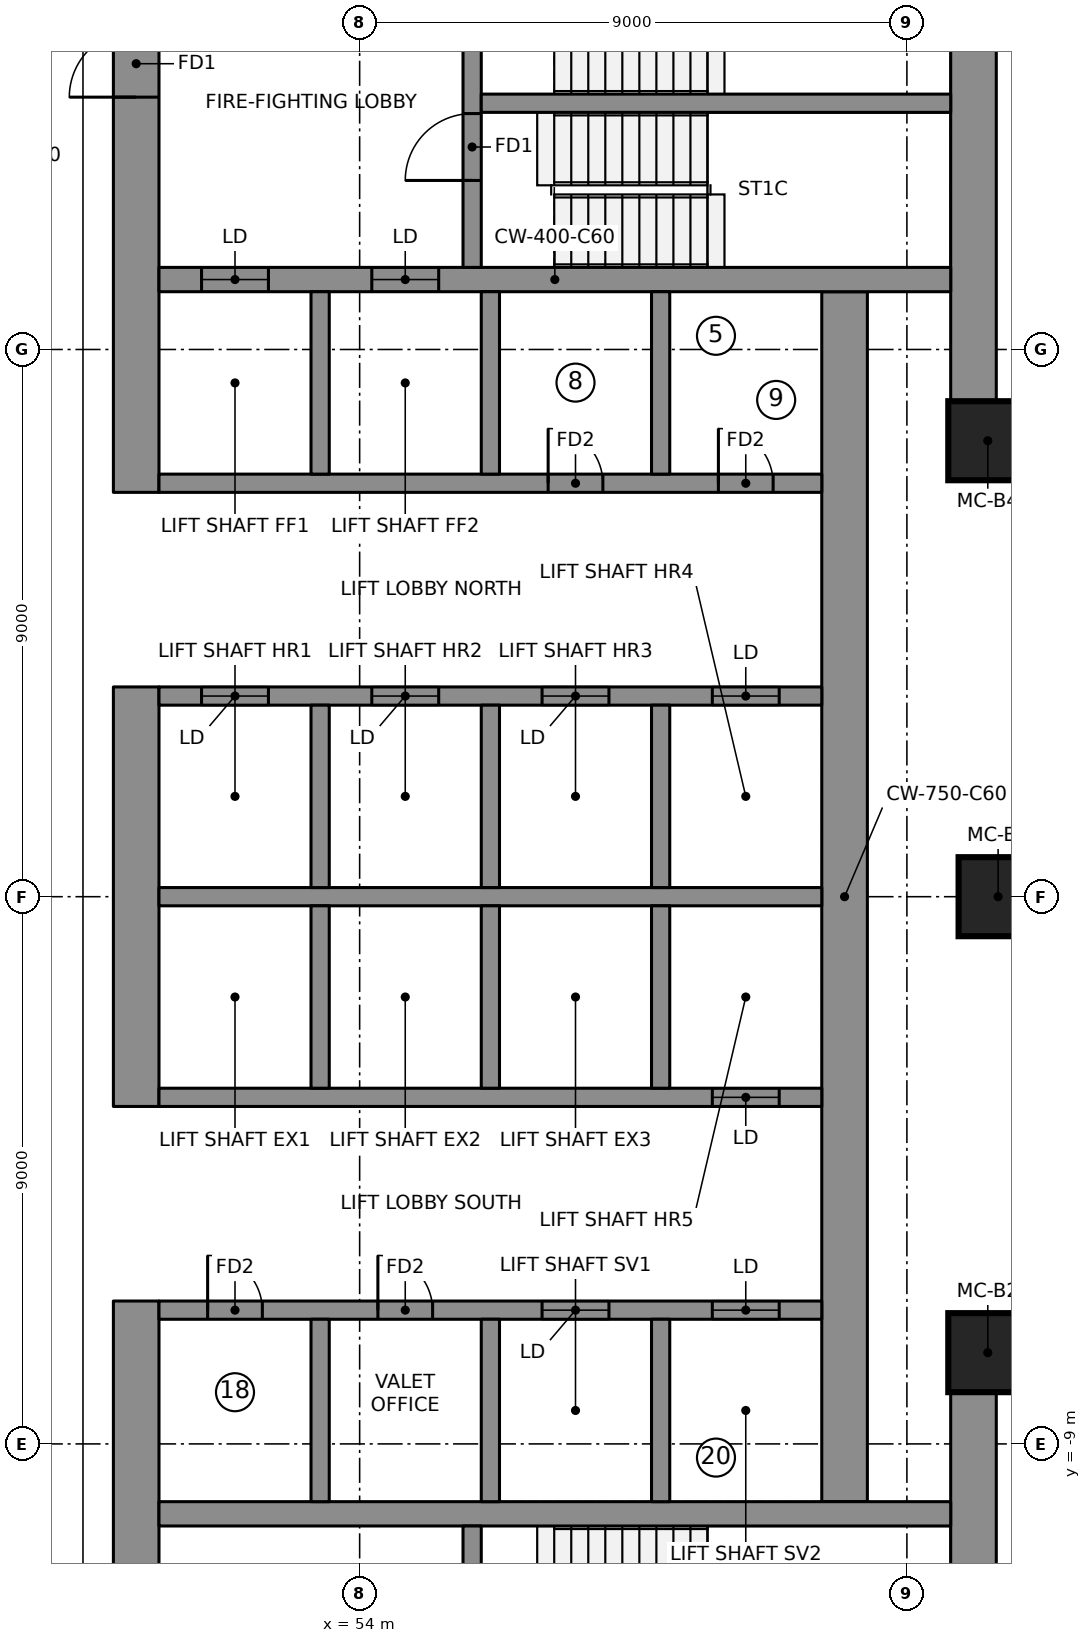
"""IFC4 building model, lengths in metres.
Left out: names, types, materials, properties, quantities, classifications, styles, units other than length and angle.
Written with IfcOpenShell. Run it as: python <this file> out.ifc"""

import sys

from ifc_helpers import new_model, si_unit, direction, frame, frame_2d, origin, origin_2d, place, context, subcontext, project, spatial, rectangle, extrude, element, fill, save


model = new_model("IFC4")
c1 = context("Model", 3, precision=1e-05, world=origin(), true_north=direction((0.0, 1.0)))
c2 = subcontext(c1, "Body", "Model", "MODEL_VIEW")
j1 = project(units=[si_unit("LENGTHUNIT", "METRE"), si_unit("PLANEANGLEUNIT", "RADIAN")], contexts=[c1])
p1 = place(None, origin())
s1 = spatial("IfcSite", under=j1, at=p1, CompositionType="ELEMENT")
p2 = place(p1, origin())
s2 = spatial("IfcBuilding", under=s1, at=p2, CompositionType="ELEMENT")
p3 = place(p2, frame((0.0, 0.0, 196.8)))
s3 = spatial("IfcBuildingStorey", under=s2, at=p3, CompositionType="ELEMENT", Elevation=196.8)
p4 = place(p3, frame((50.325, 6.65, 0.0), z_axis=(0.0, 0.0, 1.0), x_axis=(0.0, 1.0, 0.0)))
e1 = element("IfcWall", 1, at=p4, inside=s3, PredefinedType="SHEAR", context=c2, shape_type="SweptSolid", body=[
    extrude(rectangle(XDim=9.85, YDim=0.75, at=frame_2d((4.925, 0.0))), origin(), (0.0, 0.0, 1.0), 3.55),
])
p5 = place(p4, frame((6.5, 0.0, 0.0)))
e2 = element("IfcOpeningElement", 2, at=p5, cuts=e1, PredefinedType="OPENING", context=c2, shape_type="SweptSolid", body=[
    extrude(rectangle(XDim=1.1, YDim=2.1, at=frame_2d((0.55, 1.05))), frame((0.0, 0.385, 0.0), z_axis=(0.0, -1.0, 0.0), x_axis=(1.0, 0.0, 0.0)), (0.0, 0.0, 1.0), 0.77),
])
p6 = place(p3, frame((50.325, -3.45, 0.0), z_axis=(0.0, 0.0, 1.0), x_axis=(0.0, 1.0, 0.0)))
e3 = element("IfcWall", 3, at=p6, inside=s3, PredefinedType="SHEAR", context=c2, shape_type="SweptSolid", body=[
    extrude(rectangle(XDim=6.9, YDim=0.75, at=frame_2d((3.45, 0.0))), origin(), (0.0, 0.0, 1.0), 3.55),
])
p7 = place(p3, frame((50.325, -16.5, 0.0), z_axis=(0.0, 0.0, 1.0), x_axis=(0.0, 1.0, 0.0)))
e4 = element("IfcWall", 4, at=p7, inside=s3, PredefinedType="SHEAR", context=c2, shape_type="SweptSolid", body=[
    extrude(rectangle(XDim=9.85, YDim=0.75, at=frame_2d((4.925, 0.0))), origin(), (0.0, 0.0, 1.0), 3.55),
])
p8 = place(p7, frame((2.25, 0.0, 0.0)))
e5 = element("IfcOpeningElement", 5, at=p8, cuts=e4, PredefinedType="OPENING", context=c2, shape_type="SweptSolid", body=[
    extrude(rectangle(XDim=1.1, YDim=2.1, at=frame_2d((0.55, 1.05))), frame((0.0, 0.385, 0.0), z_axis=(0.0, -1.0, 0.0), x_axis=(1.0, 0.0, 0.0)), (0.0, 0.0, 1.0), 0.77),
])
for number, where, z_axis, x_axis in (
    (6, (64.095, 8.099, 0.0), (0.0, 0.0, 1.0), (0.0, 1.0, 0.0)),
    (7, (64.095, -15.75, 0.0), (0.0, 0.0, 1.0), (0.0, 1.0, 0.0)),
):
    element("IfcWall", number, at=place(p3, frame(where, z_axis=z_axis, x_axis=x_axis)), inside=s3, PredefinedType="SHEAR", context=c2, shape_type="SweptSolid", body=[
        extrude(rectangle(XDim=7.651, YDim=0.75, at=frame_2d((3.825, 0.0))), origin(), (0.0, 0.0, 1.0), 3.55),
    ])
p9 = place(p3, frame((61.975, -9.95, 0.0), z_axis=(0.0, 0.0, 1.0), x_axis=(0.0, 1.0, 0.0)))
e8 = element("IfcWall", 8, at=p9, inside=s3, PredefinedType="SHEAR", context=c2, shape_type="SweptSolid", body=[
    extrude(rectangle(XDim=19.9, YDim=0.75, at=frame_2d((9.95, 0.0))), origin(), (0.0, 0.0, 1.0), 3.55),
])
p10 = place(p3, frame((50.7, 10.15, 0.0), z_axis=(0.0, 0.0, 1.0), x_axis=(1.0, 0.0, 0.0)))
e9 = element("IfcWall", 9, at=p10, inside=s3, PredefinedType="SHEAR", context=c2, shape_type="SweptSolid", body=[
    extrude(rectangle(XDim=13.02, YDim=0.4, at=frame_2d((6.51, 0.0))), origin(), (0.0, 0.0, 1.0), 3.55),
])
p11 = place(p10, frame((0.7, 0.0, 0.0)))
e10 = element("IfcOpeningElement", 10, at=p11, cuts=e9, PredefinedType="OPENING", context=c2, shape_type="SweptSolid", body=[
    extrude(rectangle(XDim=1.1, YDim=2.1, at=frame_2d((0.55, 1.05))), frame((0.0, 0.21, 0.0), z_axis=(0.0, -1.0, 0.0), x_axis=(1.0, 0.0, 0.0)), (0.0, 0.0, 1.0), 0.42),
])
p12 = place(p10, frame((3.5, 0.0, 0.0)))
e11 = element("IfcOpeningElement", 11, at=p12, cuts=e9, PredefinedType="OPENING", context=c2, shape_type="SweptSolid", body=[
    extrude(rectangle(XDim=1.1, YDim=2.1, at=frame_2d((0.55, 1.05))), frame((0.0, 0.21, 0.0), z_axis=(0.0, -1.0, 0.0), x_axis=(1.0, 0.0, 0.0)), (0.0, 0.0, 1.0), 0.42),
])
p13 = place(p3, frame((50.7, -10.15, 0.0), z_axis=(0.0, 0.0, 1.0), x_axis=(1.0, 0.0, 0.0)))
e12 = element("IfcWall", 12, at=p13, inside=s3, PredefinedType="SHEAR", context=c2, shape_type="SweptSolid", body=[
    extrude(rectangle(XDim=13.02, YDim=0.4, at=frame_2d((6.51, 0.0))), origin(), (0.0, 0.0, 1.0), 3.55),
])
p14 = place(p3, frame((50.7, 0.0, 0.0), z_axis=(0.0, 0.0, 1.0), x_axis=(1.0, 0.0, 0.0)))
e13 = element("IfcWall", 13, at=p14, inside=s3, PredefinedType="SHEAR", context=c2, shape_type="SweptSolid", body=[
    extrude(rectangle(XDim=10.9, YDim=0.3, at=frame_2d((5.45, 0.0))), origin(), (0.0, 0.0, 1.0), 3.55),
])
p15 = place(p3, frame((50.7, 3.3, 0.0), z_axis=(0.0, 0.0, 1.0), x_axis=(1.0, 0.0, 0.0)))
e14 = element("IfcWall", 14, at=p15, inside=s3, PredefinedType="SHEAR", context=c2, shape_type="SweptSolid", body=[
    extrude(rectangle(XDim=10.9, YDim=0.3, at=frame_2d((5.45, 0.0))), origin(), (0.0, 0.0, 1.0), 3.55),
])
p16 = place(p15, frame((0.7, 0.0, 0.0)))
e15 = element("IfcOpeningElement", 15, at=p16, cuts=e14, PredefinedType="OPENING", context=c2, shape_type="SweptSolid", body=[
    extrude(rectangle(XDim=1.1, YDim=2.1, at=frame_2d((0.55, 1.05))), frame((0.0, 0.16, 0.0), z_axis=(0.0, -1.0, 0.0), x_axis=(1.0, 0.0, 0.0)), (0.0, 0.0, 1.0), 0.32),
])
p17 = place(p15, frame((3.5, 0.0, 0.0)))
e16 = element("IfcOpeningElement", 16, at=p17, cuts=e14, PredefinedType="OPENING", context=c2, shape_type="SweptSolid", body=[
    extrude(rectangle(XDim=1.1, YDim=2.1, at=frame_2d((0.55, 1.05))), frame((0.0, 0.16, 0.0), z_axis=(0.0, -1.0, 0.0), x_axis=(1.0, 0.0, 0.0)), (0.0, 0.0, 1.0), 0.32),
])
p18 = place(p15, frame((6.3, 0.0, 0.0)))
e17 = element("IfcOpeningElement", 17, at=p18, cuts=e14, PredefinedType="OPENING", context=c2, shape_type="SweptSolid", body=[
    extrude(rectangle(XDim=1.1, YDim=2.1, at=frame_2d((0.55, 1.05))), frame((0.0, 0.16, 0.0), z_axis=(0.0, -1.0, 0.0), x_axis=(1.0, 0.0, 0.0)), (0.0, 0.0, 1.0), 0.32),
])
p19 = place(p15, frame((9.1, 0.0, 0.0)))
e18 = element("IfcOpeningElement", 18, at=p19, cuts=e14, PredefinedType="OPENING", context=c2, shape_type="SweptSolid", body=[
    extrude(rectangle(XDim=1.1, YDim=2.1, at=frame_2d((0.55, 1.05))), frame((0.0, 0.16, 0.0), z_axis=(0.0, -1.0, 0.0), x_axis=(1.0, 0.0, 0.0)), (0.0, 0.0, 1.0), 0.32),
])
p20 = place(p3, frame((50.7, 6.8, 0.0), z_axis=(0.0, 0.0, 1.0), x_axis=(1.0, 0.0, 0.0)))
e19 = element("IfcWall", 19, at=p20, inside=s3, PredefinedType="SHEAR", context=c2, shape_type="SweptSolid", body=[
    extrude(rectangle(XDim=10.9, YDim=0.3, at=frame_2d((5.45, 0.0))), origin(), (0.0, 0.0, 1.0), 3.55),
])
p21 = place(p20, frame((6.4, 0.0, 0.0)))
e20 = element("IfcOpeningElement", 20, at=p21, cuts=e19, PredefinedType="OPENING", context=c2, shape_type="SweptSolid", body=[
    extrude(rectangle(XDim=0.9, YDim=2.1, at=frame_2d((0.45, 1.05))), frame((0.0, 0.16, 0.0), z_axis=(0.0, -1.0, 0.0), x_axis=(1.0, 0.0, 0.0)), (0.0, 0.0, 1.0), 0.32),
])
p22 = place(p20, frame((9.2, 0.0, 0.0)))
e21 = element("IfcOpeningElement", 21, at=p22, cuts=e19, PredefinedType="OPENING", context=c2, shape_type="SweptSolid", body=[
    extrude(rectangle(XDim=0.9, YDim=2.1, at=frame_2d((0.45, 1.05))), frame((0.0, 0.16, 0.0), z_axis=(0.0, -1.0, 0.0), x_axis=(1.0, 0.0, 0.0)), (0.0, 0.0, 1.0), 0.32),
])
for number, where, z_axis, x_axis in (
    (22, (53.35, 0.15, 0.0), (0.0, 0.0, 1.0), (0.0, 1.0, 0.0)),
    (23, (53.35, 6.95, 0.0), (0.0, 0.0, 1.0), (0.0, 1.0, 0.0)),
    (24, (56.15, 0.15, 0.0), (0.0, 0.0, 1.0), (0.0, 1.0, 0.0)),
    (25, (56.15, 6.95, 0.0), (0.0, 0.0, 1.0), (0.0, 1.0, 0.0)),
    (26, (58.95, 0.15, 0.0), (0.0, 0.0, 1.0), (0.0, 1.0, 0.0)),
    (27, (58.95, 6.95, 0.0), (0.0, 0.0, 1.0), (0.0, 1.0, 0.0)),
):
    element("IfcWall", number, at=place(p3, frame(where, z_axis=z_axis, x_axis=x_axis)), inside=s3, PredefinedType="SHEAR", context=c2, shape_type="SweptSolid", body=[
        extrude(rectangle(XDim=3.0, YDim=0.3, at=frame_2d((1.5, 0.0))), origin(), (0.0, 0.0, 1.0), 3.55),
    ])
p23 = place(p3, frame((50.7, -3.3, 0.0), z_axis=(0.0, 0.0, 1.0), x_axis=(1.0, 0.0, 0.0)))
e28 = element("IfcWall", 28, at=p23, inside=s3, PredefinedType="SHEAR", context=c2, shape_type="SweptSolid", body=[
    extrude(rectangle(XDim=10.9, YDim=0.3, at=frame_2d((5.45, 0.0))), origin(), (0.0, 0.0, 1.0), 3.55),
])
p24 = place(p23, frame((9.1, 0.0, 0.0)))
e29 = element("IfcOpeningElement", 29, at=p24, cuts=e28, PredefinedType="OPENING", context=c2, shape_type="SweptSolid", body=[
    extrude(rectangle(XDim=1.1, YDim=2.1, at=frame_2d((0.55, 1.05))), frame((0.0, 0.16, 0.0), z_axis=(0.0, -1.0, 0.0), x_axis=(1.0, 0.0, 0.0)), (0.0, 0.0, 1.0), 0.32),
])
p25 = place(p3, frame((50.7, -6.8, 0.0), z_axis=(0.0, 0.0, 1.0), x_axis=(1.0, 0.0, 0.0)))
e30 = element("IfcWall", 30, at=p25, inside=s3, PredefinedType="SHEAR", context=c2, shape_type="SweptSolid", body=[
    extrude(rectangle(XDim=10.9, YDim=0.3, at=frame_2d((5.45, 0.0))), origin(), (0.0, 0.0, 1.0), 3.55),
])
p26 = place(p25, frame((6.3, 0.0, 0.0)))
e31 = element("IfcOpeningElement", 31, at=p26, cuts=e30, PredefinedType="OPENING", context=c2, shape_type="SweptSolid", body=[
    extrude(rectangle(XDim=1.1, YDim=2.1, at=frame_2d((0.55, 1.05))), frame((0.0, 0.16, 0.0), z_axis=(0.0, -1.0, 0.0), x_axis=(1.0, 0.0, 0.0)), (0.0, 0.0, 1.0), 0.32),
])
p27 = place(p25, frame((9.1, 0.0, 0.0)))
e32 = element("IfcOpeningElement", 32, at=p27, cuts=e30, PredefinedType="OPENING", context=c2, shape_type="SweptSolid", body=[
    extrude(rectangle(XDim=1.1, YDim=2.1, at=frame_2d((0.55, 1.05))), frame((0.0, 0.16, 0.0), z_axis=(0.0, -1.0, 0.0), x_axis=(1.0, 0.0, 0.0)), (0.0, 0.0, 1.0), 0.32),
])
p28 = place(p25, frame((0.8, 0.0, 0.0)))
e33 = element("IfcOpeningElement", 33, at=p28, cuts=e30, PredefinedType="OPENING", context=c2, shape_type="SweptSolid", body=[
    extrude(rectangle(XDim=0.9, YDim=2.1, at=frame_2d((0.45, 1.05))), frame((0.0, 0.16, 0.0), z_axis=(0.0, -1.0, 0.0), x_axis=(1.0, 0.0, 0.0)), (0.0, 0.0, 1.0), 0.32),
])
p29 = place(p25, frame((3.6, 0.0, 0.0)))
e34 = element("IfcOpeningElement", 34, at=p29, cuts=e30, PredefinedType="OPENING", context=c2, shape_type="SweptSolid", body=[
    extrude(rectangle(XDim=0.9, YDim=2.1, at=frame_2d((0.45, 1.05))), frame((0.0, 0.16, 0.0), z_axis=(0.0, -1.0, 0.0), x_axis=(1.0, 0.0, 0.0)), (0.0, 0.0, 1.0), 0.32),
])
for number, where, z_axis, x_axis in (
    (35, (53.35, -3.15, 0.0), (0.0, 0.0, 1.0), (0.0, 1.0, 0.0)),
    (36, (53.35, -9.95, 0.0), (0.0, 0.0, 1.0), (0.0, 1.0, 0.0)),
    (37, (56.15, -3.15, 0.0), (0.0, 0.0, 1.0), (0.0, 1.0, 0.0)),
    (38, (56.15, -9.95, 0.0), (0.0, 0.0, 1.0), (0.0, 1.0, 0.0)),
    (39, (58.95, -3.15, 0.0), (0.0, 0.0, 1.0), (0.0, 1.0, 0.0)),
    (40, (58.95, -9.95, 0.0), (0.0, 0.0, 1.0), (0.0, 1.0, 0.0)),
):
    element("IfcWall", number, at=place(p3, frame(where, z_axis=z_axis, x_axis=x_axis)), inside=s3, PredefinedType="SHEAR", context=c2, shape_type="SweptSolid", body=[
        extrude(rectangle(XDim=3.0, YDim=0.3, at=frame_2d((1.5, 0.0))), origin(), (0.0, 0.0, 1.0), 3.55),
    ])
p30 = place(p3, frame((55.85, 10.35, 0.0), z_axis=(0.0, 0.0, 1.0), x_axis=(0.0, 1.0, 0.0)))
e41 = element("IfcWall", 41, at=p30, inside=s3, PredefinedType="SHEAR", context=c2, shape_type="SweptSolid", body=[
    extrude(rectangle(XDim=5.4, YDim=0.3, at=frame_2d((2.7, 0.0))), origin(), (0.0, 0.0, 1.0), 3.55),
])
p31 = place(p30, frame((1.43, 0.0, 0.0)))
e42 = element("IfcOpeningElement", 42, at=p31, cuts=e41, PredefinedType="OPENING", context=c2, shape_type="SweptSolid", body=[
    extrude(rectangle(XDim=1.1, YDim=2.1, at=frame_2d((0.55, 1.05))), frame((0.0, 0.16, 0.0), z_axis=(0.0, -1.0, 0.0), x_axis=(1.0, 0.0, 0.0)), (0.0, 0.0, 1.0), 0.32),
])
p32 = place(p30, frame((3.6, 0.0, 0.0)))
e43 = element("IfcOpeningElement", 43, at=p32, cuts=e41, PredefinedType="OPENING", context=c2, shape_type="SweptSolid", body=[
    extrude(rectangle(XDim=1.1, YDim=2.1, at=frame_2d((0.55, 1.05))), frame((0.0, 0.16, 0.0), z_axis=(0.0, -1.0, 0.0), x_axis=(1.0, 0.0, 0.0)), (0.0, 0.0, 1.0), 0.32),
])
p33 = place(p3, frame((55.85, -15.75, 0.0), z_axis=(0.0, 0.0, 1.0), x_axis=(0.0, 1.0, 0.0)))
e44 = element("IfcWall", 44, at=p33, inside=s3, PredefinedType="SHEAR", context=c2, shape_type="SweptSolid", body=[
    extrude(rectangle(XDim=5.4, YDim=0.3, at=frame_2d((2.7, 0.0))), origin(), (0.0, 0.0, 1.0), 3.55),
])
p34 = place(p33, frame((3.6, 0.0, 0.0)))
e45 = element("IfcOpeningElement", 45, at=p34, cuts=e44, PredefinedType="OPENING", context=c2, shape_type="SweptSolid", body=[
    extrude(rectangle(XDim=1.1, YDim=2.1, at=frame_2d((0.55, 1.05))), frame((0.0, 0.16, 0.0), z_axis=(0.0, -1.0, 0.0), x_axis=(1.0, 0.0, 0.0)), (0.0, 0.0, 1.0), 0.32),
])
p35 = place(p33, frame((0.8, 0.0, 0.0)))
e46 = element("IfcOpeningElement", 46, at=p35, cuts=e44, PredefinedType="OPENING", context=c2, shape_type="SweptSolid", body=[
    extrude(rectangle(XDim=0.9, YDim=2.1, at=frame_2d((0.45, 1.05))), frame((0.0, 0.16, 0.0), z_axis=(0.0, -1.0, 0.0), x_axis=(1.0, 0.0, 0.0)), (0.0, 0.0, 1.0), 0.32),
])
p36 = place(p3, frame((56.0, 13.05, 0.0), z_axis=(0.0, 0.0, 1.0), x_axis=(1.0, 0.0, 0.0)))
e47 = element("IfcWall", 47, at=p36, inside=s3, PredefinedType="SHEAR", context=c2, shape_type="SweptSolid", body=[
    extrude(rectangle(XDim=7.72, YDim=0.3, at=frame_2d((3.86, 0.0))), origin(), (0.0, 0.0, 1.0), 3.55),
])
for number, where, z_axis, x_axis in (
    (48, (64.33, -7.499, 0.0), (0.0, 0.0, 1.0), (1.0, 0.0, 0.0)),
    (49, (64.5, 0.0, 0.0), (0.0, 0.0, 1.0), (1.0, 0.0, 0.0)),
    (50, (64.33, 7.499, 0.0), (0.0, 0.0, 1.0), (1.0, 0.0, 0.0)),
):
    element("IfcColumn", number, at=place(p3, frame(where, z_axis=z_axis, x_axis=x_axis)), inside=s3, PredefinedType="COLUMN", context=c2, shape_type="SweptSolid", body=[
        extrude(rectangle(XDim=1.3, YDim=1.3, at=origin_2d()), origin(), (0.0, 0.0, 1.0), 3.55),
    ])
p37 = place(p11, origin())
e51 = element("IfcDoor", 51, at=p37, inside=s3, OperationType="DOUBLE_DOOR_SLIDING", PredefinedType="DOOR", context=c2, shape_type="SweptSolid", body=[
    extrude(rectangle(XDim=1.1, YDim=2.1, at=frame_2d((0.55, 1.05))), frame((0.0, 0.025, 0.0), z_axis=(0.0, -1.0, 0.0), x_axis=(1.0, 0.0, 0.0)), (0.0, 0.0, 1.0), 0.05),
])
fill(e10, e51)
p38 = place(p12, origin())
e52 = element("IfcDoor", 52, at=p38, inside=s3, OperationType="DOUBLE_DOOR_SLIDING", PredefinedType="DOOR", context=c2, shape_type="SweptSolid", body=[
    extrude(rectangle(XDim=1.1, YDim=2.1, at=frame_2d((0.55, 1.05))), frame((0.0, 0.025, 0.0), z_axis=(0.0, -1.0, 0.0), x_axis=(1.0, 0.0, 0.0)), (0.0, 0.0, 1.0), 0.05),
])
fill(e11, e52)
p39 = place(p16, origin())
e53 = element("IfcDoor", 53, at=p39, inside=s3, OperationType="DOUBLE_DOOR_SLIDING", PredefinedType="DOOR", context=c2, shape_type="SweptSolid", body=[
    extrude(rectangle(XDim=1.1, YDim=2.1, at=frame_2d((0.55, 1.05))), frame((0.0, 0.025, 0.0), z_axis=(0.0, -1.0, 0.0), x_axis=(1.0, 0.0, 0.0)), (0.0, 0.0, 1.0), 0.05),
])
fill(e15, e53)
p40 = place(p17, origin())
e54 = element("IfcDoor", 54, at=p40, inside=s3, OperationType="DOUBLE_DOOR_SLIDING", PredefinedType="DOOR", context=c2, shape_type="SweptSolid", body=[
    extrude(rectangle(XDim=1.1, YDim=2.1, at=frame_2d((0.55, 1.05))), frame((0.0, 0.025, 0.0), z_axis=(0.0, -1.0, 0.0), x_axis=(1.0, 0.0, 0.0)), (0.0, 0.0, 1.0), 0.05),
])
fill(e16, e54)
p41 = place(p18, origin())
e55 = element("IfcDoor", 55, at=p41, inside=s3, OperationType="DOUBLE_DOOR_SLIDING", PredefinedType="DOOR", context=c2, shape_type="SweptSolid", body=[
    extrude(rectangle(XDim=1.1, YDim=2.1, at=frame_2d((0.55, 1.05))), frame((0.0, 0.025, 0.0), z_axis=(0.0, -1.0, 0.0), x_axis=(1.0, 0.0, 0.0)), (0.0, 0.0, 1.0), 0.05),
])
fill(e17, e55)
p42 = place(p19, origin())
e56 = element("IfcDoor", 56, at=p42, inside=s3, OperationType="DOUBLE_DOOR_SLIDING", PredefinedType="DOOR", context=c2, shape_type="SweptSolid", body=[
    extrude(rectangle(XDim=1.1, YDim=2.1, at=frame_2d((0.55, 1.05))), frame((0.0, 0.025, 0.0), z_axis=(0.0, -1.0, 0.0), x_axis=(1.0, 0.0, 0.0)), (0.0, 0.0, 1.0), 0.05),
])
fill(e18, e56)
p43 = place(p24, origin())
e57 = element("IfcDoor", 57, at=p43, inside=s3, OperationType="DOUBLE_DOOR_SLIDING", PredefinedType="DOOR", context=c2, shape_type="SweptSolid", body=[
    extrude(rectangle(XDim=1.1, YDim=2.1, at=frame_2d((0.55, 1.05))), frame((0.0, 0.025, 0.0), z_axis=(0.0, -1.0, 0.0), x_axis=(1.0, 0.0, 0.0)), (0.0, 0.0, 1.0), 0.05),
])
fill(e29, e57)
p44 = place(p26, origin())
e58 = element("IfcDoor", 58, at=p44, inside=s3, OperationType="DOUBLE_DOOR_SLIDING", PredefinedType="DOOR", context=c2, shape_type="SweptSolid", body=[
    extrude(rectangle(XDim=1.1, YDim=2.1, at=frame_2d((0.55, 1.05))), frame((0.0, 0.025, 0.0), z_axis=(0.0, -1.0, 0.0), x_axis=(1.0, 0.0, 0.0)), (0.0, 0.0, 1.0), 0.05),
])
fill(e31, e58)
p45 = place(p27, origin())
e59 = element("IfcDoor", 59, at=p45, inside=s3, OperationType="DOUBLE_DOOR_SLIDING", PredefinedType="DOOR", context=c2, shape_type="SweptSolid", body=[
    extrude(rectangle(XDim=1.1, YDim=2.1, at=frame_2d((0.55, 1.05))), frame((0.0, 0.025, 0.0), z_axis=(0.0, -1.0, 0.0), x_axis=(1.0, 0.0, 0.0)), (0.0, 0.0, 1.0), 0.05),
])
fill(e32, e59)
p46 = place(p31, origin())
e60 = element("IfcDoor", 60, at=p46, inside=s3, OperationType="SINGLE_SWING_RIGHT", PredefinedType="DOOR", context=c2, shape_type="SweptSolid", body=[
    extrude(rectangle(XDim=1.1, YDim=2.1, at=frame_2d((0.55, 1.05))), frame((0.0, 0.025, 0.0), z_axis=(0.0, -1.0, 0.0), x_axis=(1.0, 0.0, 0.0)), (0.0, 0.0, 1.0), 0.05),
])
fill(e42, e60)
p47 = place(p5, origin())
e61 = element("IfcDoor", 61, at=p47, inside=s3, OperationType="SINGLE_SWING_RIGHT", PredefinedType="DOOR", context=c2, shape_type="SweptSolid", body=[
    extrude(rectangle(XDim=1.1, YDim=2.1, at=frame_2d((0.55, 1.05))), frame((0.0, 0.025, 0.0), z_axis=(0.0, -1.0, 0.0), x_axis=(1.0, 0.0, 0.0)), (0.0, 0.0, 1.0), 0.05),
])
fill(e2, e61)
p48 = place(p21, origin())
e62 = element("IfcDoor", 62, at=p48, inside=s3, OperationType="SINGLE_SWING_LEFT", PredefinedType="DOOR", context=c2, shape_type="SweptSolid", body=[
    extrude(rectangle(XDim=0.9, YDim=2.1, at=frame_2d((0.45, 1.05))), frame((0.0, 0.025, 0.0), z_axis=(0.0, -1.0, 0.0), x_axis=(1.0, 0.0, 0.0)), (0.0, 0.0, 1.0), 0.05),
])
fill(e20, e62)
p49 = place(p22, origin())
e63 = element("IfcDoor", 63, at=p49, inside=s3, OperationType="SINGLE_SWING_LEFT", PredefinedType="DOOR", context=c2, shape_type="SweptSolid", body=[
    extrude(rectangle(XDim=0.9, YDim=2.1, at=frame_2d((0.45, 1.05))), frame((0.0, 0.025, 0.0), z_axis=(0.0, -1.0, 0.0), x_axis=(1.0, 0.0, 0.0)), (0.0, 0.0, 1.0), 0.05),
])
fill(e21, e63)
p50 = place(p28, origin())
e64 = element("IfcDoor", 64, at=p50, inside=s3, OperationType="SINGLE_SWING_LEFT", PredefinedType="DOOR", context=c2, shape_type="SweptSolid", body=[
    extrude(rectangle(XDim=0.9, YDim=2.1, at=frame_2d((0.45, 1.05))), frame((0.0, 0.025, 0.0), z_axis=(0.0, -1.0, 0.0), x_axis=(1.0, 0.0, 0.0)), (0.0, 0.0, 1.0), 0.05),
])
fill(e33, e64)
p51 = place(p29, origin())
e65 = element("IfcDoor", 65, at=p51, inside=s3, OperationType="SINGLE_SWING_LEFT", PredefinedType="DOOR", context=c2, shape_type="SweptSolid", body=[
    extrude(rectangle(XDim=0.9, YDim=2.1, at=frame_2d((0.45, 1.05))), frame((0.0, 0.025, 0.0), z_axis=(0.0, -1.0, 0.0), x_axis=(1.0, 0.0, 0.0)), (0.0, 0.0, 1.0), 0.05),
])
fill(e34, e65)
save(model, sys.argv[1])
